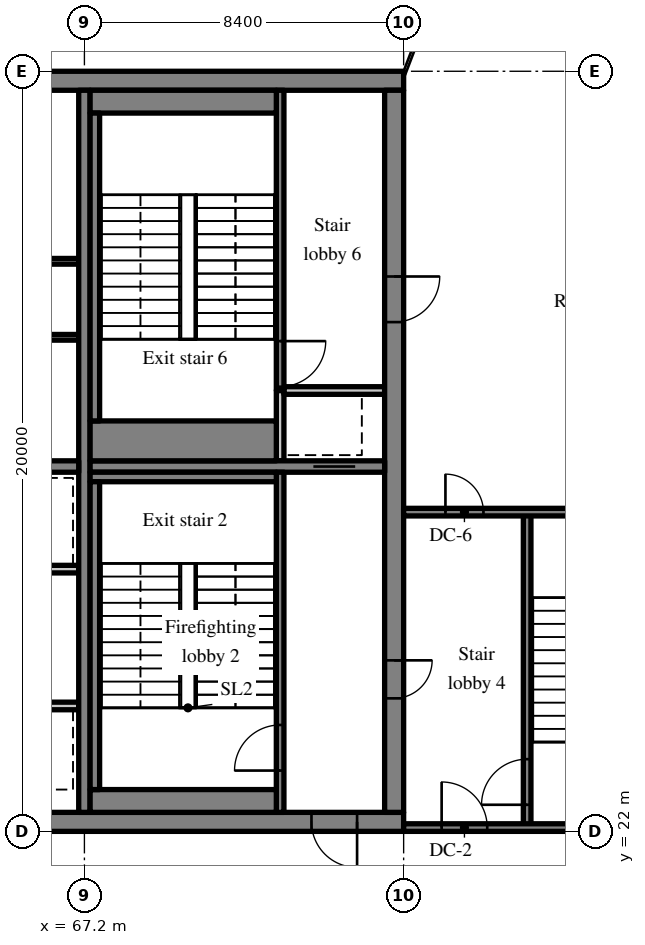
"""IFC4 building model, lengths in metres.
Left out: names, types, materials, properties, quantities, classifications, styles, units other than length and angle.
Written with IfcOpenShell. Run it as: python <this file> out.ifc"""

import sys

from ifc_helpers import new_model, si_unit, direction, frame, frame_2d, origin, place, context, subcontext, project, spatial, rectangle, extrude, source, transform, mapped, element, fill, save


model = new_model("IFC4")
c1 = context("Model", 3, precision=1e-05, world=origin(), true_north=direction((0.0, 1.0)))
c2 = subcontext(c1, "Body", "Model", "MODEL_VIEW")
j1 = project(units=[si_unit("LENGTHUNIT", "METRE"), si_unit("PLANEANGLEUNIT", "RADIAN")], contexts=[c1])
p1 = place(None, origin())
s1 = spatial("IfcSite", under=j1, at=p1, CompositionType="ELEMENT")
p2 = place(p1, origin())
s2 = spatial("IfcBuilding", under=s1, at=p2, CompositionType="ELEMENT")
p3 = place(p2, frame((0.0, 0.0, 305.7)))
s3 = spatial("IfcBuildingStorey", under=s2, at=p3, CompositionType="ELEMENT", Elevation=305.7)
m1 = source(origin(), c2, "Body", "SweptSolid", [
    extrude(rectangle(XDim=50.4, YDim=0.5, at=frame_2d((25.2, 0.0))), origin(), (0.0, 0.0, 1.0), 3.72),
])
p4 = place(p3, frame((25.2, 22.25, 0.0), z_axis=(0.0, 0.0, 1.0), x_axis=(1.0, 0.0, 0.0)))
e1 = element("IfcWall", 1, at=p4, inside=s3, PredefinedType="SHEAR", context=c2, shape_type="MappedRepresentation", body=[
    mapped(m1, transform((0.0, 0.0, 0.0), scale=1.0)),
])
m2 = source(origin(), c2, "Body", "SweptSolid", [
    extrude(rectangle(XDim=1.8, YDim=2.1, at=frame_2d((0.9, 1.05))), frame((0.0, 0.26, 0.0), z_axis=(0.0, -1.0, 0.0), x_axis=(1.0, 0.0, 0.0)), (0.0, 0.0, 1.0), 0.52),
])
p5 = place(p4, frame((15.9, 0.0, 0.0)))
e2 = element("IfcOpeningElement", 2, at=p5, cuts=e1, PredefinedType="OPENING", context=c2, shape_type="MappedRepresentation", body=[
    mapped(m2, transform((0.0, 0.0, 0.0), scale=1.0)),
])
m3 = source(origin(), c2, "Body", "SweptSolid", [
    extrude(rectangle(XDim=0.9, YDim=2.1, at=frame_2d((0.45, 1.05))), frame((0.0, 0.26, 0.0), z_axis=(0.0, -1.0, 0.0), x_axis=(1.0, 0.0, 0.0)), (0.0, 0.0, 1.0), 0.52),
])
p6 = place(p4, frame((11.175, 0.0, 0.0)))
e3 = element("IfcOpeningElement", 3, at=p6, cuts=e1, PredefinedType="OPENING", context=c2, shape_type="MappedRepresentation", body=[
    mapped(m3, transform((0.0, 0.0, 0.0), scale=1.0)),
])
p7 = place(p4, frame((21.525, 0.0, 0.0)))
e4 = element("IfcOpeningElement", 4, at=p7, cuts=e1, PredefinedType="OPENING", context=c2, shape_type="MappedRepresentation", body=[
    mapped(m3, transform((0.0, 0.0, 0.0), scale=1.0)),
])
p8 = place(p4, frame((32.7, 0.0, 0.0)))
e5 = element("IfcOpeningElement", 5, at=p8, cuts=e1, PredefinedType="OPENING", context=c2, shape_type="MappedRepresentation", body=[
    mapped(m2, transform((0.0, 0.0, 0.0), scale=1.0)),
])
m4 = source(origin(), c2, "Body", "SweptSolid", [
    extrude(rectangle(XDim=1.2, YDim=2.1, at=frame_2d((0.6, 1.05))), frame((0.0, 0.26, 0.0), z_axis=(0.0, -1.0, 0.0), x_axis=(1.0, 0.0, 0.0)), (0.0, 0.0, 1.0), 0.52),
])
p9 = place(p4, frame((6.5, 0.0, 0.0)))
e6 = element("IfcOpeningElement", 6, at=p9, cuts=e1, PredefinedType="OPENING", context=c2, shape_type="MappedRepresentation", body=[
    mapped(m4, transform((0.0, 0.0, 0.0), scale=1.0)),
])
p10 = place(p4, frame((47.975, 0.0, 0.0)))
e7 = element("IfcOpeningElement", 7, at=p10, cuts=e1, PredefinedType="OPENING", context=c2, shape_type="MappedRepresentation", body=[
    mapped(m4, transform((0.0, 0.0, 0.0), scale=1.0)),
])
p11 = place(p3, frame((25.2, 41.75, 0.0), z_axis=(0.0, 0.0, 1.0), x_axis=(1.0, 0.0, 0.0)))
e8 = element("IfcWall", 8, at=p11, inside=s3, PredefinedType="SHEAR", context=c2, shape_type="MappedRepresentation", body=[
    mapped(m1, transform((0.0, 0.0, 0.0), scale=1.0)),
])
m5 = source(origin(), c2, "Body", "SweptSolid", [
    extrude(rectangle(XDim=19.0, YDim=0.5, at=frame_2d((9.5, 0.0))), origin(), (0.0, 0.0, 1.0), 3.72),
])
p12 = place(p3, frame((75.35, 22.5, 0.0), z_axis=(0.0, 0.0, 1.0), x_axis=(0.0, 1.0, 0.0)))
e9 = element("IfcWall", 9, at=p12, inside=s3, PredefinedType="SHEAR", context=c2, shape_type="MappedRepresentation", body=[
    mapped(m5, transform((0.0, 0.0, 0.0), scale=1.0)),
])
m6 = source(origin(), c2, "Body", "SweptSolid", [
    extrude(rectangle(XDim=1.0, YDim=2.1, at=frame_2d((0.5, 1.05))), frame((0.0, 0.26, 0.0), z_axis=(0.0, -1.0, 0.0), x_axis=(1.0, 0.0, 0.0)), (0.0, 0.0, 1.0), 0.52),
])
p13 = place(p12, frame((3.0, 0.0, 0.0)))
e10 = element("IfcOpeningElement", 10, at=p13, cuts=e9, PredefinedType="OPENING", context=c2, shape_type="MappedRepresentation", body=[
    mapped(m6, transform((0.0, 0.0, 0.0), scale=1.0)),
])
p14 = place(p12, frame((12.9, 0.0, 0.0)))
e11 = element("IfcOpeningElement", 11, at=p14, cuts=e9, PredefinedType="OPENING", context=c2, shape_type="MappedRepresentation", body=[
    mapped(m4, transform((0.0, 0.0, 0.0), scale=1.0)),
])
m7 = source(origin(), c2, "Body", "SweptSolid", [
    extrude(rectangle(XDim=19.0, YDim=0.3, at=frame_2d((9.5, 0.0))), origin(), (0.0, 0.0, 1.0), 3.72),
])
p15 = place(p3, frame((67.2, 22.5, 0.0), z_axis=(0.0, 0.0, 1.0), x_axis=(0.0, 1.0, 0.0)))
e12 = element("IfcWall", 12, at=p15, inside=s3, PredefinedType="SHEAR", context=c2, shape_type="MappedRepresentation", body=[
    mapped(m7, transform((0.0, 0.0, 0.0), scale=1.0)),
])
m8 = source(origin(), c2, "Body", "SweptSolid", [
    extrude(rectangle(XDim=16.5, YDim=0.3, at=frame_2d((8.25, 0.0))), origin(), (0.0, 0.0, 1.0), 3.72),
])
p16 = place(p3, frame((50.55, 31.6, 0.0), z_axis=(0.0, 0.0, 1.0), x_axis=(1.0, 0.0, 0.0)))
e13 = element("IfcWall", 13, at=p16, inside=s3, PredefinedType="SHEAR", context=c2, shape_type="MappedRepresentation", body=[
    mapped(m8, transform((0.0, 0.0, 0.0), scale=1.0)),
])
m9 = source(origin(), c2, "Body", "SweptSolid", [
    extrude(rectangle(XDim=1.0, YDim=2.1, at=frame_2d((0.5, 1.05))), frame((0.0, 0.16, 0.0), z_axis=(0.0, -1.0, 0.0), x_axis=(1.0, 0.0, 0.0)), (0.0, 0.0, 1.0), 0.32),
])
p17 = place(p16, frame((0.625, 0.0, 0.0)))
e14 = element("IfcOpeningElement", 14, at=p17, cuts=e13, PredefinedType="OPENING", context=c2, shape_type="MappedRepresentation", body=[
    mapped(m9, transform((0.0, 0.0, 0.0), scale=1.0)),
])
m10 = source(origin(), c2, "Body", "SweptSolid", [
    extrude(rectangle(XDim=7.75, YDim=0.3, at=frame_2d((3.875, 0.0))), origin(), (0.0, 0.0, 1.0), 3.72),
])
p18 = place(p3, frame((67.35, 31.6, 0.0), z_axis=(0.0, 0.0, 1.0), x_axis=(1.0, 0.0, 0.0)))
e15 = element("IfcWall", 15, at=p18, inside=s3, PredefinedType="SHEAR", context=c2, shape_type="MappedRepresentation", body=[
    mapped(m10, transform((0.0, 0.0, 0.0), scale=1.0)),
])
m11 = source(origin(), c2, "Body", "SweptSolid", [
    extrude(rectangle(XDim=1.1, YDim=2.1, at=frame_2d((0.55, 1.05))), frame((0.0, 0.16, 0.0), z_axis=(0.0, -1.0, 0.0), x_axis=(1.0, 0.0, 0.0)), (0.0, 0.0, 1.0), 0.32),
])
p19 = place(p18, frame((5.875, 0.0, 0.0)))
e16 = element("IfcOpeningElement", 16, at=p19, cuts=e15, PredefinedType="OPENING", context=c2, shape_type="MappedRepresentation", body=[
    mapped(m11, transform((0.0, 0.0, 0.0), scale=1.0)),
])
m12 = source(origin(), c2, "Body", "SweptSolid", [
    extrude(rectangle(XDim=6.15, YDim=0.2, at=frame_2d((3.075, 0.0))), origin(), (0.0, 0.0, 1.0), 3.72),
])
p20 = place(p3, frame((67.05, 25.3, 0.0), z_axis=(0.0, 0.0, 1.0), x_axis=(-1.0, 0.0, 0.0)))
e17 = element("IfcWall", 17, at=p20, inside=s3, PredefinedType="SOLIDWALL", context=c2, shape_type="MappedRepresentation", body=[
    mapped(m12, transform((0.0, 0.0, 0.0), scale=1.0)),
])
m13 = source(origin(), c2, "Body", "SweptSolid", [
    extrude(rectangle(XDim=1.1, YDim=2.1, at=frame_2d((0.55, 1.05))), frame((0.0, 0.11, 0.0), z_axis=(0.0, -1.0, 0.0), x_axis=(1.0, 0.0, 0.0)), (0.0, 0.0, 1.0), 0.22),
])
p21 = place(p20, frame((1.1, 0.0, 0.0)))
e18 = element("IfcOpeningElement", 18, at=p21, cuts=e17, PredefinedType="OPENING", context=c2, shape_type="MappedRepresentation", body=[
    mapped(m13, transform((0.0, 0.0, 0.0), scale=1.0)),
])
p22 = place(p20, frame((4.1, 0.0, 0.0)))
e19 = element("IfcOpeningElement", 19, at=p22, cuts=e17, PredefinedType="OPENING", context=c2, shape_type="MappedRepresentation", body=[
    mapped(m13, transform((0.0, 0.0, 0.0), scale=1.0)),
])
m14 = source(origin(), c2, "Body", "SweptSolid", [
    extrude(rectangle(XDim=12.15, YDim=0.2, at=frame_2d((6.075, 0.0))), origin(), (0.0, 0.0, 1.0), 3.72),
])
p23 = place(p3, frame((67.05, 28.9, 0.0), z_axis=(0.0, 0.0, 1.0), x_axis=(-1.0, 0.0, 0.0)))
e20 = element("IfcWall", 20, at=p23, inside=s3, PredefinedType="SOLIDWALL", context=c2, shape_type="MappedRepresentation", body=[
    mapped(m14, transform((0.0, 0.0, 0.0), scale=1.0)),
])
p24 = place(p23, frame((1.1, 0.0, 0.0)))
e21 = element("IfcOpeningElement", 21, at=p24, cuts=e20, PredefinedType="OPENING", context=c2, shape_type="MappedRepresentation", body=[
    mapped(m13, transform((0.0, 0.0, 0.0), scale=1.0)),
])
p25 = place(p23, frame((4.1, 0.0, 0.0)))
e22 = element("IfcOpeningElement", 22, at=p25, cuts=e20, PredefinedType="OPENING", context=c2, shape_type="MappedRepresentation", body=[
    mapped(m13, transform((0.0, 0.0, 0.0), scale=1.0)),
])
m15 = source(origin(), c2, "Body", "SweptSolid", [
    extrude(rectangle(XDim=14.25, YDim=0.15, at=frame_2d((7.125, 0.0))), origin(), (0.0, 0.0, 1.0), 3.72),
])
p26 = place(p3, frame((67.05, 35.0, 0.0), z_axis=(0.0, 0.0, 1.0), x_axis=(-1.0, 0.0, 0.0)))
e23 = element("IfcWall", 23, at=p26, inside=s3, PredefinedType="PARTITIONING", context=c2, shape_type="MappedRepresentation", body=[
    mapped(m15, transform((0.0, 0.0, 0.0), scale=1.0)),
])
m16 = source(origin(), c2, "Body", "SweptSolid", [
    extrude(rectangle(XDim=0.9, YDim=2.1, at=frame_2d((0.45, 1.05))), frame((0.0, 0.085, 0.0), z_axis=(0.0, -1.0, 0.0), x_axis=(1.0, 0.0, 0.0)), (0.0, 0.0, 1.0), 0.17),
])
p27 = place(p26, frame((6.638, 0.0, 0.0)))
e24 = element("IfcOpeningElement", 24, at=p27, cuts=e23, PredefinedType="OPENING", context=c2, shape_type="MappedRepresentation", body=[
    mapped(m16, transform((0.0, 0.0, 0.0), scale=1.0)),
])
m17 = source(origin(), c2, "Body", "SweptSolid", [
    extrude(rectangle(XDim=16.5, YDim=0.15, at=frame_2d((8.25, 0.0))), origin(), (0.0, 0.0, 1.0), 3.72),
])
p28 = place(p3, frame((67.05, 37.0, 0.0), z_axis=(0.0, 0.0, 1.0), x_axis=(-1.0, 0.0, 0.0)))
e25 = element("IfcWall", 25, at=p28, inside=s3, PredefinedType="PARTITIONING", context=c2, shape_type="MappedRepresentation", body=[
    mapped(m17, transform((0.0, 0.0, 0.0), scale=1.0)),
])
p29 = place(p28, frame((3.263, 0.0, 0.0)))
e26 = element("IfcOpeningElement", 26, at=p29, cuts=e25, PredefinedType="OPENING", context=c2, shape_type="MappedRepresentation", body=[
    mapped(m16, transform((0.0, 0.0, 0.0), scale=1.0)),
])
p30 = place(p28, frame((8.212, 0.0, 0.0)))
e27 = element("IfcOpeningElement", 27, at=p30, cuts=e25, PredefinedType="OPENING", context=c2, shape_type="MappedRepresentation", body=[
    mapped(m16, transform((0.0, 0.0, 0.0), scale=1.0)),
])
p31 = place(p28, frame((11.513, 0.0, 0.0)))
e28 = element("IfcOpeningElement", 28, at=p31, cuts=e25, PredefinedType="OPENING", context=c2, shape_type="MappedRepresentation", body=[
    mapped(m16, transform((0.0, 0.0, 0.0), scale=1.0)),
])
p32 = place(p28, frame((14.813, 0.0, 0.0)))
e29 = element("IfcOpeningElement", 29, at=p32, cuts=e25, PredefinedType="OPENING", context=c2, shape_type="MappedRepresentation", body=[
    mapped(m16, transform((0.0, 0.0, 0.0), scale=1.0)),
])
m18 = source(origin(), c2, "Body", "SweptSolid", [
    extrude(rectangle(XDim=8.95, YDim=0.2, at=frame_2d((4.475, 0.0))), origin(), (0.0, 0.0, 1.0), 3.72),
])
p33 = place(p3, frame((72.35, 22.5, 0.0), z_axis=(0.0, 0.0, 1.0), x_axis=(0.0, 1.0, 0.0)))
e30 = element("IfcWall", 30, at=p33, inside=s3, PredefinedType="SOLIDWALL", context=c2, shape_type="MappedRepresentation", body=[
    mapped(m18, transform((0.0, 0.0, 0.0), scale=1.0)),
])
m19 = source(origin(), c2, "Body", "SweptSolid", [
    extrude(rectangle(XDim=1.2, YDim=2.1, at=frame_2d((0.6, 1.05))), frame((0.0, 0.11, 0.0), z_axis=(0.0, -1.0, 0.0), x_axis=(1.0, 0.0, 0.0)), (0.0, 0.0, 1.0), 0.22),
])
p34 = place(p33, frame((1.1, 0.0, 0.0)))
e31 = element("IfcOpeningElement", 31, at=p34, cuts=e30, PredefinedType="OPENING", context=c2, shape_type="MappedRepresentation", body=[
    mapped(m19, transform((0.0, 0.0, 0.0), scale=1.0)),
])
m20 = source(origin(), c2, "Body", "SweptSolid", [
    extrude(rectangle(XDim=1.85, YDim=0.2, at=frame_2d((0.925, 0.0))), origin(), (0.0, 0.0, 1.0), 3.72),
])
p35 = place(p3, frame((72.35, 31.75, 0.0), z_axis=(0.0, 0.0, 1.0), x_axis=(0.0, 1.0, 0.0)))
e32 = element("IfcWall", 32, at=p35, inside=s3, PredefinedType="SOLIDWALL", context=c2, shape_type="MappedRepresentation", body=[
    mapped(m20, transform((0.0, 0.0, 0.0), scale=1.0)),
])
m21 = source(origin(), c2, "Body", "SweptSolid", [
    extrude(rectangle(XDim=2.65, YDim=0.2, at=frame_2d((1.325, 0.0))), origin(), (0.0, 0.0, 1.0), 3.72),
])
p36 = place(p3, frame((72.45, 33.6, 0.0), z_axis=(0.0, 0.0, 1.0), x_axis=(1.0, 0.0, 0.0)))
e33 = element("IfcWall", 33, at=p36, inside=s3, PredefinedType="SOLIDWALL", context=c2, shape_type="MappedRepresentation", body=[
    mapped(m21, transform((0.0, 0.0, 0.0), scale=1.0)),
])
m22 = source(origin(), c2, "Body", "SweptSolid", [
    extrude(rectangle(XDim=7.9, YDim=0.2, at=frame_2d((3.95, 0.0))), origin(), (0.0, 0.0, 1.0), 3.72),
])
p37 = place(p3, frame((72.35, 33.6, 0.0), z_axis=(0.0, 0.0, 1.0), x_axis=(0.0, 1.0, 0.0)))
e34 = element("IfcWall", 34, at=p37, inside=s3, PredefinedType="SOLIDWALL", context=c2, shape_type="MappedRepresentation", body=[
    mapped(m22, transform((0.0, 0.0, 0.0), scale=1.0)),
])
p38 = place(p37, frame((0.1, 0.0, 0.0)))
e35 = element("IfcOpeningElement", 35, at=p38, cuts=e34, PredefinedType="OPENING", context=c2, shape_type="MappedRepresentation", body=[
    mapped(m19, transform((0.0, 0.0, 0.0), scale=1.0)),
])
m23 = source(origin(), c2, "Body", "SweptSolid", [
    extrude(rectangle(XDim=8.3, YDim=0.2, at=frame_2d((4.15, 0.0))), origin(), (0.0, 0.0, 1.0), 3.72),
])
p39 = place(p3, frame((78.85, 22.1, 0.0), z_axis=(0.0, 0.0, 1.0), x_axis=(0.0, 1.0, 0.0)))
e36 = element("IfcWall", 36, at=p39, inside=s3, PredefinedType="SOLIDWALL", context=c2, shape_type="MappedRepresentation", body=[
    mapped(m23, transform((0.0, 0.0, 0.0), scale=1.0)),
])
p40 = place(p39, frame((0.6, 0.0, 0.0)))
e37 = element("IfcOpeningElement", 37, at=p40, cuts=e36, PredefinedType="OPENING", context=c2, shape_type="MappedRepresentation", body=[
    mapped(m19, transform((0.0, 0.0, 0.0), scale=1.0)),
])
m24 = source(origin(), c2, "Body", "SweptSolid", [
    extrude(rectangle(XDim=8.15, YDim=0.2, at=frame_2d((4.075, 0.0))), origin(), (0.0, 0.0, 1.0), 3.72),
])
p41 = place(p3, frame((83.75, 22.1, 0.0), z_axis=(0.0, 0.0, 1.0), x_axis=(-1.0, 0.0, 0.0)))
e38 = element("IfcWall", 38, at=p41, inside=s3, PredefinedType="SOLIDWALL", context=c2, shape_type="MappedRepresentation", body=[
    mapped(m24, transform((0.0, 0.0, 0.0), scale=1.0)),
])
p42 = place(p41, frame((5.95, 0.0, 0.0)))
e39 = element("IfcOpeningElement", 39, at=p42, cuts=e38, PredefinedType="OPENING", context=c2, shape_type="MappedRepresentation", body=[
    mapped(m19, transform((0.0, 0.0, 0.0), scale=1.0)),
])
p43 = place(p3, frame((83.75, 30.4, 0.0), z_axis=(0.0, 0.0, 1.0), x_axis=(-1.0, 0.0, 0.0)))
e40 = element("IfcWall", 40, at=p43, inside=s3, PredefinedType="SOLIDWALL", context=c2, shape_type="MappedRepresentation", body=[
    mapped(m24, transform((0.0, 0.0, 0.0), scale=1.0)),
])
m25 = source(origin(), c2, "Body", "SweptSolid", [
    extrude(rectangle(XDim=1.0, YDim=2.1, at=frame_2d((0.5, 1.05))), frame((0.0, 0.11, 0.0), z_axis=(0.0, -1.0, 0.0), x_axis=(1.0, 0.0, 0.0)), (0.0, 0.0, 1.0), 0.22),
])
p44 = place(p43, frame((6.05, 0.0, 0.0)))
e41 = element("IfcOpeningElement", 41, at=p44, cuts=e40, PredefinedType="OPENING", context=c2, shape_type="MappedRepresentation", body=[
    mapped(m25, transform((0.0, 0.0, 0.0), scale=1.0)),
])
m26 = source(origin(), c2, "Body", "SweptSolid", [
    extrude(rectangle(XDim=4.9, YDim=0.6, at=frame_2d((2.45, 0.0))), origin(), (0.0, 0.0, 1.0), 3.72),
])
p45 = place(p3, frame((67.35, 22.8, 0.0), z_axis=(0.0, 0.0, 1.0), x_axis=(1.0, 0.0, 0.0)))
e42 = element("IfcWall", 42, at=p45, inside=s3, PredefinedType="SOLIDWALL", context=c2, shape_type="MappedRepresentation", body=[
    mapped(m26, transform((0.0, 0.0, 0.0), scale=1.0)),
])
m27 = source(origin(), c2, "Body", "SweptSolid", [
    extrude(rectangle(XDim=4.9, YDim=0.25, at=frame_2d((2.45, 0.0))), origin(), (0.0, 0.0, 1.0), 3.72),
])
p46 = place(p3, frame((67.35, 31.325, 0.0), z_axis=(0.0, 0.0, 1.0), x_axis=(1.0, 0.0, 0.0)))
e43 = element("IfcWall", 43, at=p46, inside=s3, PredefinedType="SOLIDWALL", context=c2, shape_type="MappedRepresentation", body=[
    mapped(m27, transform((0.0, 0.0, 0.0), scale=1.0)),
])
m28 = source(origin(), c2, "Body", "SweptSolid", [
    extrude(rectangle(XDim=8.1, YDim=0.25, at=frame_2d((4.05, 0.0))), origin(), (0.0, 0.0, 1.0), 3.72),
])
p47 = place(p3, frame((67.475, 23.1, 0.0), z_axis=(0.0, 0.0, 1.0), x_axis=(0.0, 1.0, 0.0)))
e44 = element("IfcWall", 44, at=p47, inside=s3, PredefinedType="SOLIDWALL", context=c2, shape_type="MappedRepresentation", body=[
    mapped(m28, transform((0.0, 0.0, 0.0), scale=1.0)),
])
p48 = place(p3, frame((67.35, 41.2, 0.0), z_axis=(0.0, 0.0, 1.0), x_axis=(1.0, 0.0, 0.0)))
e45 = element("IfcWall", 45, at=p48, inside=s3, PredefinedType="SOLIDWALL", context=c2, shape_type="MappedRepresentation", body=[
    mapped(m26, transform((0.0, 0.0, 0.0), scale=1.0)),
])
m29 = source(origin(), c2, "Body", "SweptSolid", [
    extrude(rectangle(XDim=4.9, YDim=1.05, at=frame_2d((2.45, 0.0))), origin(), (0.0, 0.0, 1.0), 3.72),
])
p49 = place(p3, frame((67.35, 32.275, 0.0), z_axis=(0.0, 0.0, 1.0), x_axis=(1.0, 0.0, 0.0)))
e46 = element("IfcWall", 46, at=p49, inside=s3, PredefinedType="SOLIDWALL", context=c2, shape_type="MappedRepresentation", body=[
    mapped(m29, transform((0.0, 0.0, 0.0), scale=1.0)),
])
p50 = place(p3, frame((67.475, 32.8, 0.0), z_axis=(0.0, 0.0, 1.0), x_axis=(0.0, 1.0, 0.0)))
e47 = element("IfcWall", 47, at=p50, inside=s3, PredefinedType="SOLIDWALL", context=c2, shape_type="MappedRepresentation", body=[
    mapped(m28, transform((0.0, 0.0, 0.0), scale=1.0)),
])
m30 = source(origin(), c2, "Body", "SweptSolid", [
    extrude(rectangle(XDim=1.2, YDim=2.1, at=frame_2d((0.6, 1.05))), frame((0.0, 0.025, 0.0), z_axis=(0.0, -1.0, 0.0), x_axis=(1.0, 0.0, 0.0)), (0.0, 0.0, 1.0), 0.05),
])
p51 = place(p34, origin())
e48 = element("IfcDoor", 48, at=p51, inside=s3, OperationType="SINGLE_SWING_LEFT", PredefinedType="DOOR", context=c2, shape_type="MappedRepresentation", body=[
    mapped(m30, transform((0.0, 0.0, 0.0), scale=1.0)),
])
fill(e31, e48)
m31 = source(origin(), c2, "Body", "SweptSolid", [
    extrude(rectangle(XDim=1.2, YDim=2.1, at=frame_2d((0.6, 1.05))), frame((0.0, 0.175, 0.0), z_axis=(0.0, -1.0, 0.0), x_axis=(1.0, 0.0, 0.0)), (0.0, 0.0, 1.0), 0.05),
])
p52 = place(p10, origin())
e49 = element("IfcDoor", 49, at=p52, inside=s3, OperationType="SINGLE_SWING_RIGHT", PredefinedType="DOOR", context=c2, shape_type="MappedRepresentation", body=[
    mapped(m31, transform((0.0, 0.0, 0.0), scale=1.0)),
])
fill(e7, e49)
m32 = source(origin(), c2, "Body", "SweptSolid", [
    extrude(rectangle(XDim=1.1, YDim=2.1, at=frame_2d((0.55, 1.05))), frame((0.0, 0.025, 0.0), z_axis=(0.0, -1.0, 0.0), x_axis=(1.0, 0.0, 0.0)), (0.0, 0.0, 1.0), 0.05),
])
p53 = place(p19, origin())
e50 = element("IfcDoor", 50, at=p53, inside=s3, OperationType="SLIDING_TO_LEFT", PredefinedType="DOOR", context=c2, shape_type="MappedRepresentation", body=[
    mapped(m32, transform((0.0, 0.0, 0.0), scale=1.0)),
])
fill(e16, e50)
m33 = source(origin(), c2, "Body", "SweptSolid", [
    extrude(rectangle(XDim=1.0, YDim=2.1, at=frame_2d((0.5, 1.05))), frame((0.0, 0.025, 0.0), z_axis=(0.0, -1.0, 0.0), x_axis=(1.0, 0.0, 0.0)), (0.0, 0.0, 1.0), 0.05),
])
p54 = place(p13, origin())
e51 = element("IfcDoor", 51, at=p54, inside=s3, OperationType="SINGLE_SWING_RIGHT", PredefinedType="DOOR", context=c2, shape_type="MappedRepresentation", body=[
    mapped(m33, transform((0.0, 0.0, 0.0), scale=1.0)),
])
fill(e10, e51)
p55 = place(p38, origin())
e52 = element("IfcDoor", 52, at=p55, inside=s3, OperationType="SINGLE_SWING_RIGHT", PredefinedType="DOOR", context=c2, shape_type="MappedRepresentation", body=[
    mapped(m30, transform((0.0, 0.0, 0.0), scale=1.0)),
])
fill(e35, e52)
p56 = place(p14, origin())
e53 = element("IfcDoor", 53, at=p56, inside=s3, OperationType="SINGLE_SWING_RIGHT", PredefinedType="DOOR", context=c2, shape_type="MappedRepresentation", body=[
    mapped(m30, transform((0.0, 0.0, 0.0), scale=1.0)),
])
fill(e11, e53)
p57 = place(p40, origin())
e54 = element("IfcDoor", 54, at=p57, inside=s3, OperationType="SINGLE_SWING_LEFT", PredefinedType="DOOR", context=c2, shape_type="MappedRepresentation", body=[
    mapped(m30, transform((0.0, 0.0, 0.0), scale=1.0)),
])
fill(e37, e54)
p58 = place(p42, origin())
e55 = element("IfcDoor", 55, at=p58, inside=s3, OperationType="SINGLE_SWING_RIGHT", PredefinedType="DOOR", context=c2, shape_type="MappedRepresentation", body=[
    mapped(m30, transform((0.0, 0.0, 0.0), scale=1.0)),
])
fill(e39, e55)
p59 = place(p44, origin())
e56 = element("IfcDoor", 56, at=p59, inside=s3, OperationType="SINGLE_SWING_RIGHT", PredefinedType="DOOR", context=c2, shape_type="MappedRepresentation", body=[
    mapped(m33, transform((0.0, 0.0, 0.0), scale=1.0)),
])
fill(e41, e56)
save(model, sys.argv[1])
